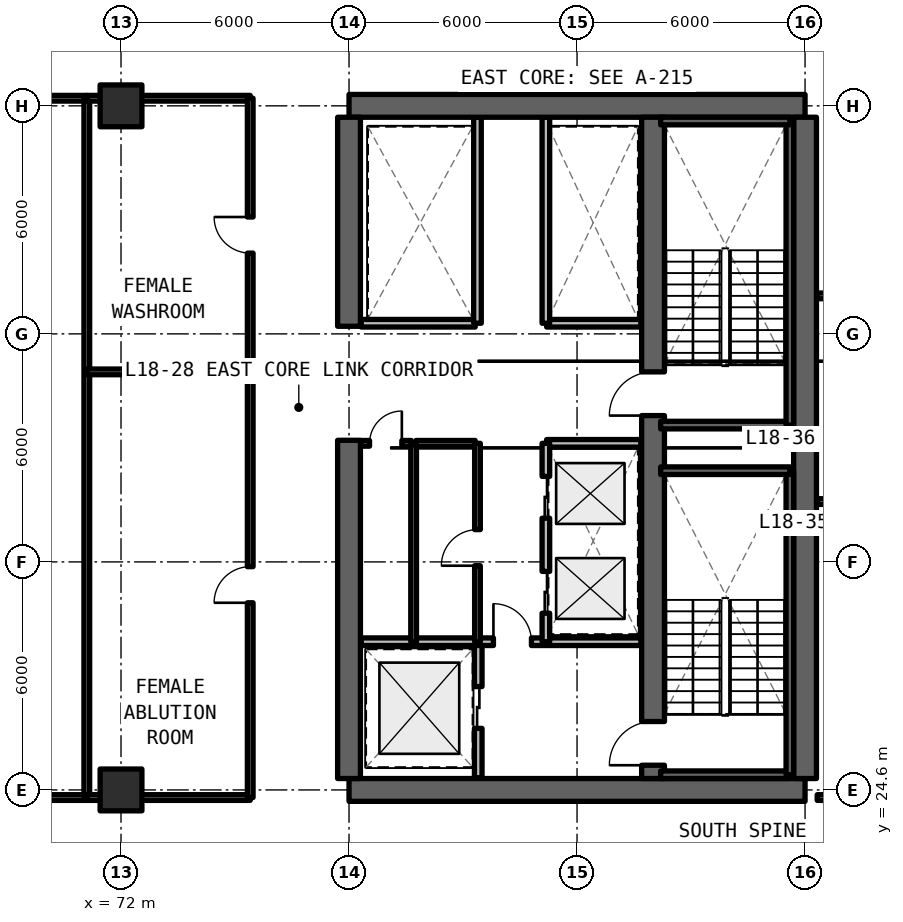
"""IFC4 building model, lengths in metres.
Left out: names, types, materials, properties, quantities, classifications, styles, units other than length and angle.
Written with IfcOpenShell. Run it as: python <this file> out.ifc"""

import sys

from ifc_helpers import new_model, si_unit, direction, frame, frame_2d, origin, origin_2d, place, context, subcontext, project, spatial, rectangle, extrude, element, fill, save


model = new_model("IFC4")
c1 = context("Model", 3, precision=1e-05, world=origin(), true_north=direction((0.0, 1.0)))
c2 = subcontext(c1, "Body", "Model", "MODEL_VIEW")
j1 = project(units=[si_unit("LENGTHUNIT", "METRE"), si_unit("PLANEANGLEUNIT", "RADIAN")], contexts=[c1])
p1 = place(None, origin())
s1 = spatial("IfcSite", under=j1, at=p1, CompositionType="ELEMENT")
p2 = place(p1, origin())
s2 = spatial("IfcBuilding", under=s1, at=p2, CompositionType="ELEMENT")
p3 = place(p2, frame((0.0, 0.0, 66.0)))
s3 = spatial("IfcBuildingStorey", under=s2, at=p3, CompositionType="ELEMENT", Elevation=66.0)
for number, where, z_axis, x_axis in (
    (1, (78.0, 24.6, 0.0), (0.0, 0.0, 1.0), (1.0, 0.0, 0.0)),
    (2, (90.0, 42.6, 0.0), (0.0, 0.0, 1.0), (-1.0, 0.0, 0.0)),
):
    element("IfcWall", number, at=place(p3, frame(where, z_axis=z_axis, x_axis=x_axis)), inside=s3, PredefinedType="SHEAR", context=c2, shape_type="SweptSolid", body=[
        extrude(rectangle(XDim=12.0, YDim=0.6, at=frame_2d((6.0, 0.0))), origin(), (0.0, 0.0, 1.0), 3.63),
    ])
p4 = place(p3, frame((90.0, 24.9, 0.0), z_axis=(0.0, 0.0, 1.0), x_axis=(0.0, 1.0, 0.0)))
e3 = element("IfcWall", 3, at=p4, inside=s3, PredefinedType="SHEAR", context=c2, shape_type="SweptSolid", body=[
    extrude(rectangle(XDim=17.4, YDim=0.6, at=frame_2d((8.7, 0.0))), origin(), (0.0, 0.0, 1.0), 3.63),
])
p5 = place(p3, frame((78.0, 24.9, 0.0), z_axis=(0.0, 0.0, 1.0), x_axis=(0.0, 1.0, 0.0)))
e4 = element("IfcWall", 4, at=p5, inside=s3, PredefinedType="SHEAR", context=c2, shape_type="SweptSolid", body=[
    extrude(rectangle(XDim=8.9, YDim=0.6, at=frame_2d((4.45, 0.0))), origin(), (0.0, 0.0, 1.0), 3.63),
])
p6 = place(p3, frame((78.0, 36.8, 0.0), z_axis=(0.0, 0.0, 1.0), x_axis=(0.0, 1.0, 0.0)))
e5 = element("IfcWall", 5, at=p6, inside=s3, PredefinedType="SHEAR", context=c2, shape_type="SweptSolid", body=[
    extrude(rectangle(XDim=5.5, YDim=0.6, at=frame_2d((2.75, 0.0))), origin(), (0.0, 0.0, 1.0), 3.63),
])
p7 = place(p3, frame((86.0, 24.9, 0.0), z_axis=(0.0, 0.0, 1.0), x_axis=(0.0, 1.0, 0.0)))
e6 = element("IfcWall", 6, at=p7, inside=s3, PredefinedType="SHEAR", context=c2, shape_type="SweptSolid", body=[
    extrude(rectangle(XDim=17.4, YDim=0.6, at=frame_2d((8.7, 0.0))), origin(), (0.0, 0.0, 1.0), 3.63),
])
p8 = place(p7, frame((0.35, 0.0, 0.0)))
e7 = element("IfcOpeningElement", 7, at=p8, cuts=e6, PredefinedType="OPENING", context=c2, shape_type="SweptSolid", body=[
    extrude(rectangle(XDim=1.15, YDim=2.15, at=frame_2d((0.575, 1.075))), frame((0.0, 0.31, 0.0), z_axis=(0.0, -1.0, 0.0), x_axis=(1.0, 0.0, 0.0)), (0.0, 0.0, 1.0), 0.62),
])
p9 = place(p7, frame((9.55, 0.0, 0.0)))
e8 = element("IfcOpeningElement", 8, at=p9, cuts=e6, PredefinedType="OPENING", context=c2, shape_type="SweptSolid", body=[
    extrude(rectangle(XDim=1.15, YDim=2.15, at=frame_2d((0.575, 1.075))), frame((0.0, 0.31, 0.0), z_axis=(0.0, -1.0, 0.0), x_axis=(1.0, 0.0, 0.0)), (0.0, 0.0, 1.0), 0.62),
])
for number, where, z_axis, x_axis in (
    (9, (72.0, 24.6, 0.0), (0.0, 0.0, 1.0), (1.0, 0.0, 0.0)),
    (10, (72.0, 42.6, 0.0), (0.0, 0.0, 1.0), (1.0, 0.0, 0.0)),
):
    element("IfcColumn", number, at=place(p3, frame(where, z_axis=z_axis, x_axis=x_axis)), inside=s3, PredefinedType="COLUMN", context=c2, shape_type="SweptSolid", body=[
        extrude(rectangle(XDim=1.1, YDim=1.1, at=origin_2d()), origin(), (0.0, 0.0, 1.0), 3.63),
    ])
p10 = place(p3, frame((81.4, 24.92, 0.0), z_axis=(0.0, 0.0, 1.0), x_axis=(0.0, 1.0, 0.0)))
e11 = element("IfcWall", 11, at=p10, inside=s3, PredefinedType="SOLIDWALL", context=c2, shape_type="SweptSolid", body=[
    extrude(rectangle(XDim=3.58, YDim=0.2, at=frame_2d((1.79, 0.0))), origin(), (0.0, 0.0, 1.0), 2.63),
])
p11 = place(p10, frame((1.3, 0.0, 0.0)))
e12 = element("IfcOpeningElement", 12, at=p11, cuts=e11, PredefinedType="OPENING", context=c2, shape_type="SweptSolid", body=[
    extrude(rectangle(XDim=1.1, YDim=2.2, at=frame_2d((0.55, 1.1))), frame((0.0, 0.11, 0.0), z_axis=(0.0, -1.0, 0.0), x_axis=(1.0, 0.0, 0.0)), (0.0, 0.0, 1.0), 0.22),
])
p12 = place(p3, frame((78.32, 28.5, 0.0), z_axis=(0.0, 0.0, 1.0), x_axis=(1.0, 0.0, 0.0)))
e13 = element("IfcWall", 13, at=p12, inside=s3, PredefinedType="SOLIDWALL", context=c2, shape_type="SweptSolid", body=[
    extrude(rectangle(XDim=7.36, YDim=0.2, at=frame_2d((3.68, 0.0))), origin(), (0.0, 0.0, 1.0), 2.63),
])
p13 = place(p12, frame((3.48, 0.0, 0.0)))
e14 = element("IfcOpeningElement", 14, at=p13, cuts=e13, PredefinedType="OPENING", context=c2, shape_type="SweptSolid", body=[
    extrude(rectangle(XDim=1.0, YDim=2.15, at=frame_2d((0.5, 1.075))), frame((0.0, 0.11, 0.0), z_axis=(0.0, -1.0, 0.0), x_axis=(1.0, 0.0, 0.0)), (0.0, 0.0, 1.0), 0.22),
])
p14 = place(p3, frame((83.2, 33.72, 0.0), z_axis=(0.0, 0.0, 1.0), x_axis=(1.0, 0.0, 0.0)))
e15 = element("IfcWall", 15, at=p14, inside=s3, PredefinedType="SOLIDWALL", context=c2, shape_type="SweptSolid", body=[
    extrude(rectangle(XDim=2.48, YDim=0.2, at=frame_2d((1.24, 0.0))), origin(), (0.0, 0.0, 1.0), 2.63),
])
p15 = place(p3, frame((83.18, 28.5, 0.0), z_axis=(0.0, 0.0, 1.0), x_axis=(0.0, 1.0, 0.0)))
e16 = element("IfcWall", 16, at=p15, inside=s3, PredefinedType="SOLIDWALL", context=c2, shape_type="SweptSolid", body=[
    extrude(rectangle(XDim=5.22, YDim=0.2, at=frame_2d((2.61, 0.0))), origin(), (0.0, 0.0, 1.0), 2.63),
])
p16 = place(p15, frame((0.75, 0.0, 0.0)))
e17 = element("IfcOpeningElement", 17, at=p16, cuts=e16, PredefinedType="OPENING", context=c2, shape_type="SweptSolid", body=[
    extrude(rectangle(XDim=1.1, YDim=2.2, at=frame_2d((0.55, 1.1))), frame((0.0, 0.11, 0.0), z_axis=(0.0, -1.0, 0.0), x_axis=(1.0, 0.0, 0.0)), (0.0, 0.0, 1.0), 0.22),
])
p17 = place(p15, frame((3.25, 0.0, 0.0)))
e18 = element("IfcOpeningElement", 18, at=p17, cuts=e16, PredefinedType="OPENING", context=c2, shape_type="SweptSolid", body=[
    extrude(rectangle(XDim=1.1, YDim=2.2, at=frame_2d((0.55, 1.1))), frame((0.0, 0.11, 0.0), z_axis=(0.0, -1.0, 0.0), x_axis=(1.0, 0.0, 0.0)), (0.0, 0.0, 1.0), 0.22),
])
p18 = place(p3, frame((79.7, 28.5, 0.0), z_axis=(0.0, 0.0, 1.0), x_axis=(0.0, 1.0, 0.0)))
e19 = element("IfcWall", 19, at=p18, inside=s3, PredefinedType="SOLIDWALL", context=c2, shape_type="SweptSolid", body=[
    extrude(rectangle(XDim=5.22, YDim=0.15, at=frame_2d((2.61, 0.0))), origin(), (0.0, 0.0, 1.0), 2.63),
])
p19 = place(p3, frame((79.76, 33.72, 0.0), z_axis=(0.0, 0.0, 1.0), x_axis=(1.0, 0.0, 0.0)))
e20 = element("IfcWall", 20, at=p19, inside=s3, PredefinedType="SOLIDWALL", context=c2, shape_type="SweptSolid", body=[
    extrude(rectangle(XDim=1.56, YDim=0.15, at=frame_2d((0.78, 0.0))), origin(), (0.0, 0.0, 1.0), 2.63),
])
p20 = place(p3, frame((78.32, 33.72, 0.0), z_axis=(0.0, 0.0, 1.0), x_axis=(1.0, 0.0, 0.0)))
e21 = element("IfcWall", 21, at=p20, inside=s3, PredefinedType="SOLIDWALL", context=c2, shape_type="SweptSolid", body=[
    extrude(rectangle(XDim=1.32, YDim=0.15, at=frame_2d((0.66, 0.0))), origin(), (0.0, 0.0, 1.0), 2.63),
])
p21 = place(p20, frame((0.22, 0.0, 0.0)))
e22 = element("IfcOpeningElement", 22, at=p21, cuts=e21, PredefinedType="OPENING", context=c2, shape_type="SweptSolid", body=[
    extrude(rectangle(XDim=0.85, YDim=2.1, at=frame_2d((0.425, 1.05))), frame((0.0, 0.085, 0.0), z_axis=(0.0, -1.0, 0.0), x_axis=(1.0, 0.0, 0.0)), (0.0, 0.0, 1.0), 0.17),
])
p22 = place(p3, frame((81.38, 28.5, 0.0), z_axis=(0.0, 0.0, 1.0), x_axis=(0.0, 1.0, 0.0)))
e23 = element("IfcWall", 23, at=p22, inside=s3, PredefinedType="SOLIDWALL", context=c2, shape_type="SweptSolid", body=[
    extrude(rectangle(XDim=5.22, YDim=0.15, at=frame_2d((2.61, 0.0))), origin(), (0.0, 0.0, 1.0), 2.63),
])
p23 = place(p22, frame((2.0, 0.0, 0.0)))
e24 = element("IfcOpeningElement", 24, at=p23, cuts=e23, PredefinedType="OPENING", context=c2, shape_type="SweptSolid", body=[
    extrude(rectangle(XDim=0.95, YDim=2.15, at=frame_2d((0.475, 1.075))), frame((0.0, 0.085, 0.0), z_axis=(0.0, -1.0, 0.0), x_axis=(1.0, 0.0, 0.0)), (0.0, 0.0, 1.0), 0.17),
])
p24 = place(p3, frame((83.2, 36.88, 0.0), z_axis=(0.0, 0.0, 1.0), x_axis=(1.0, 0.0, 0.0)))
e25 = element("IfcWall", 25, at=p24, inside=s3, PredefinedType="SOLIDWALL", context=c2, shape_type="SweptSolid", body=[
    extrude(rectangle(XDim=2.48, YDim=0.2, at=frame_2d((1.24, 0.0))), origin(), (0.0, 0.0, 1.0), 2.63),
])
p25 = place(p3, frame((83.18, 36.88, 0.0), z_axis=(0.0, 0.0, 1.0), x_axis=(0.0, 1.0, 0.0)))
e26 = element("IfcWall", 26, at=p25, inside=s3, PredefinedType="SOLIDWALL", context=c2, shape_type="SweptSolid", body=[
    extrude(rectangle(XDim=5.42, YDim=0.2, at=frame_2d((2.71, 0.0))), origin(), (0.0, 0.0, 1.0), 2.63),
])
p26 = place(p3, frame((78.32, 36.88, 0.0), z_axis=(0.0, 0.0, 1.0), x_axis=(1.0, 0.0, 0.0)))
e27 = element("IfcWall", 27, at=p26, inside=s3, PredefinedType="SOLIDWALL", context=c2, shape_type="SweptSolid", body=[
    extrude(rectangle(XDim=3.0, YDim=0.2, at=frame_2d((1.5, 0.0))), origin(), (0.0, 0.0, 1.0), 2.63),
])
p27 = place(p3, frame((81.38, 36.88, 0.0), z_axis=(0.0, 0.0, 1.0), x_axis=(0.0, 1.0, 0.0)))
e28 = element("IfcWall", 28, at=p27, inside=s3, PredefinedType="SOLIDWALL", context=c2, shape_type="SweptSolid", body=[
    extrude(rectangle(XDim=5.42, YDim=0.2, at=frame_2d((2.71, 0.0))), origin(), (0.0, 0.0, 1.0), 2.63),
])
p28 = place(p3, frame((42.1, 24.4, 0.0), z_axis=(0.0, 0.0, 1.0), x_axis=(1.0, 0.0, 0.0)))
e29 = element("IfcWall", 29, at=p28, inside=s3, PredefinedType="SOLIDWALL", context=c2, shape_type="SweptSolid", body=[
    extrude(rectangle(XDim=29.0, YDim=0.15, at=frame_2d((14.5, 0.0))), origin(), (0.0, 0.0, 1.0), 2.625),
])
p29 = place(p28, frame((13.8, 0.0, 0.0)))
e30 = element("IfcOpeningElement", 30, at=p29, cuts=e29, PredefinedType="OPENING", context=c2, shape_type="SweptSolid", body=[
    extrude(rectangle(XDim=1.4, YDim=2.15, at=frame_2d((0.7, 1.075))), frame((0.0, 0.085, 0.0), z_axis=(0.0, -1.0, 0.0), x_axis=(1.0, 0.0, 0.0)), (0.0, 0.0, 1.0), 0.17),
])
p30 = place(p3, frame((42.1, 42.8, 0.0), z_axis=(0.0, 0.0, 1.0), x_axis=(1.0, 0.0, 0.0)))
e31 = element("IfcWall", 31, at=p30, inside=s3, PredefinedType="SOLIDWALL", context=c2, shape_type="SweptSolid", body=[
    extrude(rectangle(XDim=29.0, YDim=0.15, at=frame_2d((14.5, 0.0))), origin(), (0.0, 0.0, 1.0), 2.625),
])
p31 = place(p3, frame((71.1, 24.4, 0.0), z_axis=(0.0, 0.0, 1.0), x_axis=(0.0, 1.0, 0.0)))
e32 = element("IfcWall", 32, at=p31, inside=s3, PredefinedType="SOLIDWALL", context=c2, shape_type="SweptSolid", body=[
    extrude(rectangle(XDim=18.4, YDim=0.15, at=frame_2d((9.2, 0.0))), origin(), (0.0, 0.0, 1.0), 2.63),
])
p32 = place(p3, frame((71.1, 24.4, 0.0), z_axis=(0.0, 0.0, 1.0), x_axis=(1.0, 0.0, 0.0)))
e33 = element("IfcWall", 33, at=p32, inside=s3, PredefinedType="SOLIDWALL", context=c2, shape_type="SweptSolid", body=[
    extrude(rectangle(XDim=4.3, YDim=0.15, at=frame_2d((2.15, 0.0))), origin(), (0.0, 0.0, 1.0), 2.625),
])
p33 = place(p3, frame((71.1, 35.6, 0.0), z_axis=(0.0, 0.0, 1.0), x_axis=(1.0, 0.0, 0.0)))
e34 = element("IfcWall", 34, at=p33, inside=s3, PredefinedType="SOLIDWALL", context=c2, shape_type="SweptSolid", body=[
    extrude(rectangle(XDim=4.3, YDim=0.15, at=frame_2d((2.15, 0.0))), origin(), (0.0, 0.0, 1.0), 2.63),
])
p34 = place(p3, frame((75.4, 24.4, 0.0), z_axis=(0.0, 0.0, 1.0), x_axis=(0.0, 1.0, 0.0)))
e35 = element("IfcWall", 35, at=p34, inside=s3, PredefinedType="SOLIDWALL", context=c2, shape_type="SweptSolid", body=[
    extrude(rectangle(XDim=11.2, YDim=0.15, at=frame_2d((5.6, 0.0))), origin(), (0.0, 0.0, 1.0), 2.63),
])
p35 = place(p34, frame((5.125, 0.0, 0.0)))
e36 = element("IfcOpeningElement", 36, at=p35, cuts=e35, PredefinedType="OPENING", context=c2, shape_type="SweptSolid", body=[
    extrude(rectangle(XDim=0.95, YDim=2.15, at=frame_2d((0.475, 1.075))), frame((0.0, 0.085, 0.0), z_axis=(0.0, -1.0, 0.0), x_axis=(1.0, 0.0, 0.0)), (0.0, 0.0, 1.0), 0.17),
])
p36 = place(p3, frame((71.1, 42.8, 0.0), z_axis=(0.0, 0.0, 1.0), x_axis=(1.0, 0.0, 0.0)))
e37 = element("IfcWall", 37, at=p36, inside=s3, PredefinedType="SOLIDWALL", context=c2, shape_type="SweptSolid", body=[
    extrude(rectangle(XDim=4.3, YDim=0.15, at=frame_2d((2.15, 0.0))), origin(), (0.0, 0.0, 1.0), 2.625),
])
p37 = place(p3, frame((75.4, 35.6, 0.0), z_axis=(0.0, 0.0, 1.0), x_axis=(0.0, 1.0, 0.0)))
e38 = element("IfcWall", 38, at=p37, inside=s3, PredefinedType="SOLIDWALL", context=c2, shape_type="SweptSolid", body=[
    extrude(rectangle(XDim=7.2, YDim=0.15, at=frame_2d((3.6, 0.0))), origin(), (0.0, 0.0, 1.0), 2.63),
])
p38 = place(p37, frame((3.125, 0.0, 0.0)))
e39 = element("IfcOpeningElement", 39, at=p38, cuts=e38, PredefinedType="OPENING", context=c2, shape_type="SweptSolid", body=[
    extrude(rectangle(XDim=0.95, YDim=2.15, at=frame_2d((0.475, 1.075))), frame((0.0, 0.085, 0.0), z_axis=(0.0, -1.0, 0.0), x_axis=(1.0, 0.0, 0.0)), (0.0, 0.0, 1.0), 0.17),
])
p39 = place(p3, frame((90.32, 32.188, 0.0), z_axis=(0.0, 0.0, 1.0), x_axis=(1.0, 0.0, 0.0)))
e40 = element("IfcWall", 40, at=p39, inside=s3, PredefinedType="PARTITIONING", context=c2, shape_type="SweptSolid", body=[
    extrude(rectangle(XDim=2.35, YDim=0.15, at=frame_2d((1.175, 0.0))), origin(), (0.0, 0.0, 1.0), 2.63),
])
p40 = place(p3, frame((90.32, 37.6, 0.0), z_axis=(0.0, 0.0, 1.0), x_axis=(1.0, 0.0, 0.0)))
e41 = element("IfcWall", 41, at=p40, inside=s3, PredefinedType="PARTITIONING", context=c2, shape_type="SweptSolid", body=[
    extrude(rectangle(XDim=10.24, YDim=0.15, at=frame_2d((5.12, 0.0))), origin(), (0.0, 0.0, 1.0), 2.63),
])
p41 = place(p40, frame((3.412, 0.0, 0.0)))
e42 = element("IfcOpeningElement", 42, at=p41, cuts=e41, PredefinedType="OPENING", context=c2, shape_type="SweptSolid", body=[
    extrude(rectangle(XDim=0.85, YDim=2.1, at=frame_2d((0.425, 1.05))), frame((0.0, 0.085, 0.0), z_axis=(0.0, -1.0, 0.0), x_axis=(1.0, 0.0, 0.0)), (0.0, 0.0, 1.0), 0.17),
])
p42 = place(p40, frame((7.357, 0.0, 0.0)))
e43 = element("IfcOpeningElement", 43, at=p42, cuts=e41, PredefinedType="OPENING", context=c2, shape_type="SweptSolid", body=[
    extrude(rectangle(XDim=0.85, YDim=2.1, at=frame_2d((0.425, 1.05))), frame((0.0, 0.085, 0.0), z_axis=(0.0, -1.0, 0.0), x_axis=(1.0, 0.0, 0.0)), (0.0, 0.0, 1.0), 0.17),
])
p43 = place(p3, frame((90.32, 24.4, 0.0), z_axis=(0.0, 0.0, 1.0), x_axis=(1.0, 0.0, 0.0)))
e44 = element("IfcWall", 44, at=p43, inside=s3, PredefinedType="SOLIDWALL", context=c2, shape_type="SweptSolid", body=[
    extrude(rectangle(XDim=10.24, YDim=0.15, at=frame_2d((5.12, 0.0))), origin(), (0.0, 0.0, 1.0), 2.625),
])
p44 = place(p43, frame((3.913, 0.0, 0.0)))
e45 = element("IfcOpeningElement", 45, at=p44, cuts=e44, PredefinedType="OPENING", context=c2, shape_type="SweptSolid", body=[
    extrude(rectangle(XDim=0.95, YDim=2.15, at=frame_2d((0.475, 1.075))), frame((0.0, 0.085, 0.0), z_axis=(0.0, -1.0, 0.0), x_axis=(1.0, 0.0, 0.0)), (0.0, 0.0, 1.0), 0.17),
])
p45 = place(p3, frame((86.2, 25.0, 0.0), z_axis=(0.0, 0.0, 1.0), x_axis=(1.0, 0.0, 0.0)))
e46 = element("IfcWall", 46, at=p45, inside=s3, PredefinedType="SOLIDWALL", context=c2, shape_type="SweptSolid", body=[
    extrude(rectangle(XDim=3.4, YDim=0.2, at=frame_2d((1.7, 0.0))), origin(), (0.0, 0.0, 1.0), 3.63),
])
p46 = place(p3, frame((89.6, 25.0, 0.0), z_axis=(0.0, 0.0, 1.0), x_axis=(0.0, 1.0, 0.0)))
e47 = element("IfcWall", 47, at=p46, inside=s3, PredefinedType="SOLIDWALL", context=c2, shape_type="SweptSolid", body=[
    extrude(rectangle(XDim=8.0, YDim=0.2, at=frame_2d((4.0, 0.0))), origin(), (0.0, 0.0, 1.0), 3.63),
])
for number, where, z_axis, x_axis in (
    (48, (89.6, 33.0, 0.0), (0.0, 0.0, 1.0), (-1.0, 0.0, 0.0)),
    (49, (86.2, 34.2, 0.0), (0.0, 0.0, 1.0), (1.0, 0.0, 0.0)),
):
    element("IfcWall", number, at=place(p3, frame(where, z_axis=z_axis, x_axis=x_axis)), inside=s3, PredefinedType="SOLIDWALL", context=c2, shape_type="SweptSolid", body=[
        extrude(rectangle(XDim=3.4, YDim=0.2, at=frame_2d((1.7, 0.0))), origin(), (0.0, 0.0, 1.0), 3.63),
    ])
p47 = place(p3, frame((89.6, 34.2, 0.0), z_axis=(0.0, 0.0, 1.0), x_axis=(0.0, 1.0, 0.0)))
e50 = element("IfcWall", 50, at=p47, inside=s3, PredefinedType="SOLIDWALL", context=c2, shape_type="SweptSolid", body=[
    extrude(rectangle(XDim=8.0, YDim=0.2, at=frame_2d((4.0, 0.0))), origin(), (0.0, 0.0, 1.0), 3.63),
])
p48 = place(p3, frame((89.6, 42.2, 0.0), z_axis=(0.0, 0.0, 1.0), x_axis=(-1.0, 0.0, 0.0)))
e51 = element("IfcWall", 51, at=p48, inside=s3, PredefinedType="SOLIDWALL", context=c2, shape_type="SweptSolid", body=[
    extrude(rectangle(XDim=3.4, YDim=0.2, at=frame_2d((1.7, 0.0))), origin(), (0.0, 0.0, 1.0), 3.63),
])
p49 = place(p11, origin())
e52 = element("IfcDoor", 52, at=p49, inside=s3, OperationType="SLIDING_TO_LEFT", PredefinedType="DOOR", context=c2, shape_type="SweptSolid", body=[
    extrude(rectangle(XDim=1.1, YDim=2.2, at=frame_2d((0.55, 1.1))), frame((0.0, 0.025, 0.0), z_axis=(0.0, -1.0, 0.0), x_axis=(1.0, 0.0, 0.0)), (0.0, 0.0, 1.0), 0.05),
])
fill(e12, e52)
p50 = place(p13, origin())
e53 = element("IfcDoor", 53, at=p50, inside=s3, OperationType="SINGLE_SWING_LEFT", PredefinedType="DOOR", context=c2, shape_type="SweptSolid", body=[
    extrude(rectangle(XDim=1.0, YDim=2.15, at=frame_2d((0.5, 1.075))), frame((0.0, 0.025, 0.0), z_axis=(0.0, -1.0, 0.0), x_axis=(1.0, 0.0, 0.0)), (0.0, 0.0, 1.0), 0.05),
])
fill(e14, e53)
p51 = place(p16, origin())
e54 = element("IfcDoor", 54, at=p51, inside=s3, OperationType="SLIDING_TO_LEFT", PredefinedType="DOOR", context=c2, shape_type="SweptSolid", body=[
    extrude(rectangle(XDim=1.1, YDim=2.2, at=frame_2d((0.55, 1.1))), frame((0.0, 0.025, 0.0), z_axis=(0.0, -1.0, 0.0), x_axis=(1.0, 0.0, 0.0)), (0.0, 0.0, 1.0), 0.05),
])
fill(e17, e54)
p52 = place(p17, origin())
e55 = element("IfcDoor", 55, at=p52, inside=s3, OperationType="SLIDING_TO_RIGHT", PredefinedType="DOOR", context=c2, shape_type="SweptSolid", body=[
    extrude(rectangle(XDim=1.1, YDim=2.2, at=frame_2d((0.55, 1.1))), frame((0.0, 0.025, 0.0), z_axis=(0.0, -1.0, 0.0), x_axis=(1.0, 0.0, 0.0)), (0.0, 0.0, 1.0), 0.05),
])
fill(e18, e55)
p53 = place(p21, origin())
e56 = element("IfcDoor", 56, at=p53, inside=s3, OperationType="SINGLE_SWING_RIGHT", PredefinedType="DOOR", context=c2, shape_type="SweptSolid", body=[
    extrude(rectangle(XDim=0.85, YDim=2.1, at=frame_2d((0.425, 1.05))), frame((0.0, 0.025, 0.0), z_axis=(0.0, -1.0, 0.0), x_axis=(1.0, 0.0, 0.0)), (0.0, 0.0, 1.0), 0.05),
])
fill(e22, e56)
p54 = place(p23, origin())
e57 = element("IfcDoor", 57, at=p54, inside=s3, OperationType="SINGLE_SWING_LEFT", PredefinedType="DOOR", context=c2, shape_type="SweptSolid", body=[
    extrude(rectangle(XDim=0.95, YDim=2.15, at=frame_2d((0.475, 1.075))), frame((0.0, 0.025, 0.0), z_axis=(0.0, -1.0, 0.0), x_axis=(1.0, 0.0, 0.0)), (0.0, 0.0, 1.0), 0.05),
])
fill(e24, e57)
p55 = place(p35, origin())
e58 = element("IfcDoor", 58, at=p55, inside=s3, OperationType="SINGLE_SWING_LEFT", PredefinedType="DOOR", context=c2, shape_type="SweptSolid", body=[
    extrude(rectangle(XDim=0.95, YDim=2.15, at=frame_2d((0.475, 1.075))), frame((0.0, 0.025, 0.0), z_axis=(0.0, -1.0, 0.0), x_axis=(1.0, 0.0, 0.0)), (0.0, 0.0, 1.0), 0.05),
])
fill(e36, e58)
p56 = place(p38, origin())
e59 = element("IfcDoor", 59, at=p56, inside=s3, OperationType="SINGLE_SWING_RIGHT", PredefinedType="DOOR", context=c2, shape_type="SweptSolid", body=[
    extrude(rectangle(XDim=0.95, YDim=2.15, at=frame_2d((0.475, 1.075))), frame((0.0, 0.025, 0.0), z_axis=(0.0, -1.0, 0.0), x_axis=(1.0, 0.0, 0.0)), (0.0, 0.0, 1.0), 0.05),
])
fill(e39, e59)
p57 = place(p8, origin())
e60 = element("IfcDoor", 60, at=p57, inside=s3, OperationType="SINGLE_SWING_RIGHT", PredefinedType="DOOR", context=c2, shape_type="SweptSolid", body=[
    extrude(rectangle(XDim=1.15, YDim=2.15, at=frame_2d((0.575, 1.075))), frame((0.0, 0.025, 0.0), z_axis=(0.0, -1.0, 0.0), x_axis=(1.0, 0.0, 0.0)), (0.0, 0.0, 1.0), 0.05),
])
fill(e7, e60)
p58 = place(p9, origin())
e61 = element("IfcDoor", 61, at=p58, inside=s3, OperationType="SINGLE_SWING_LEFT", PredefinedType="DOOR", context=c2, shape_type="SweptSolid", body=[
    extrude(rectangle(XDim=1.15, YDim=2.15, at=frame_2d((0.575, 1.075))), frame((0.0, 0.025, 0.0), z_axis=(0.0, -1.0, 0.0), x_axis=(1.0, 0.0, 0.0)), (0.0, 0.0, 1.0), 0.05),
])
fill(e8, e61)
save(model, sys.argv[1])
